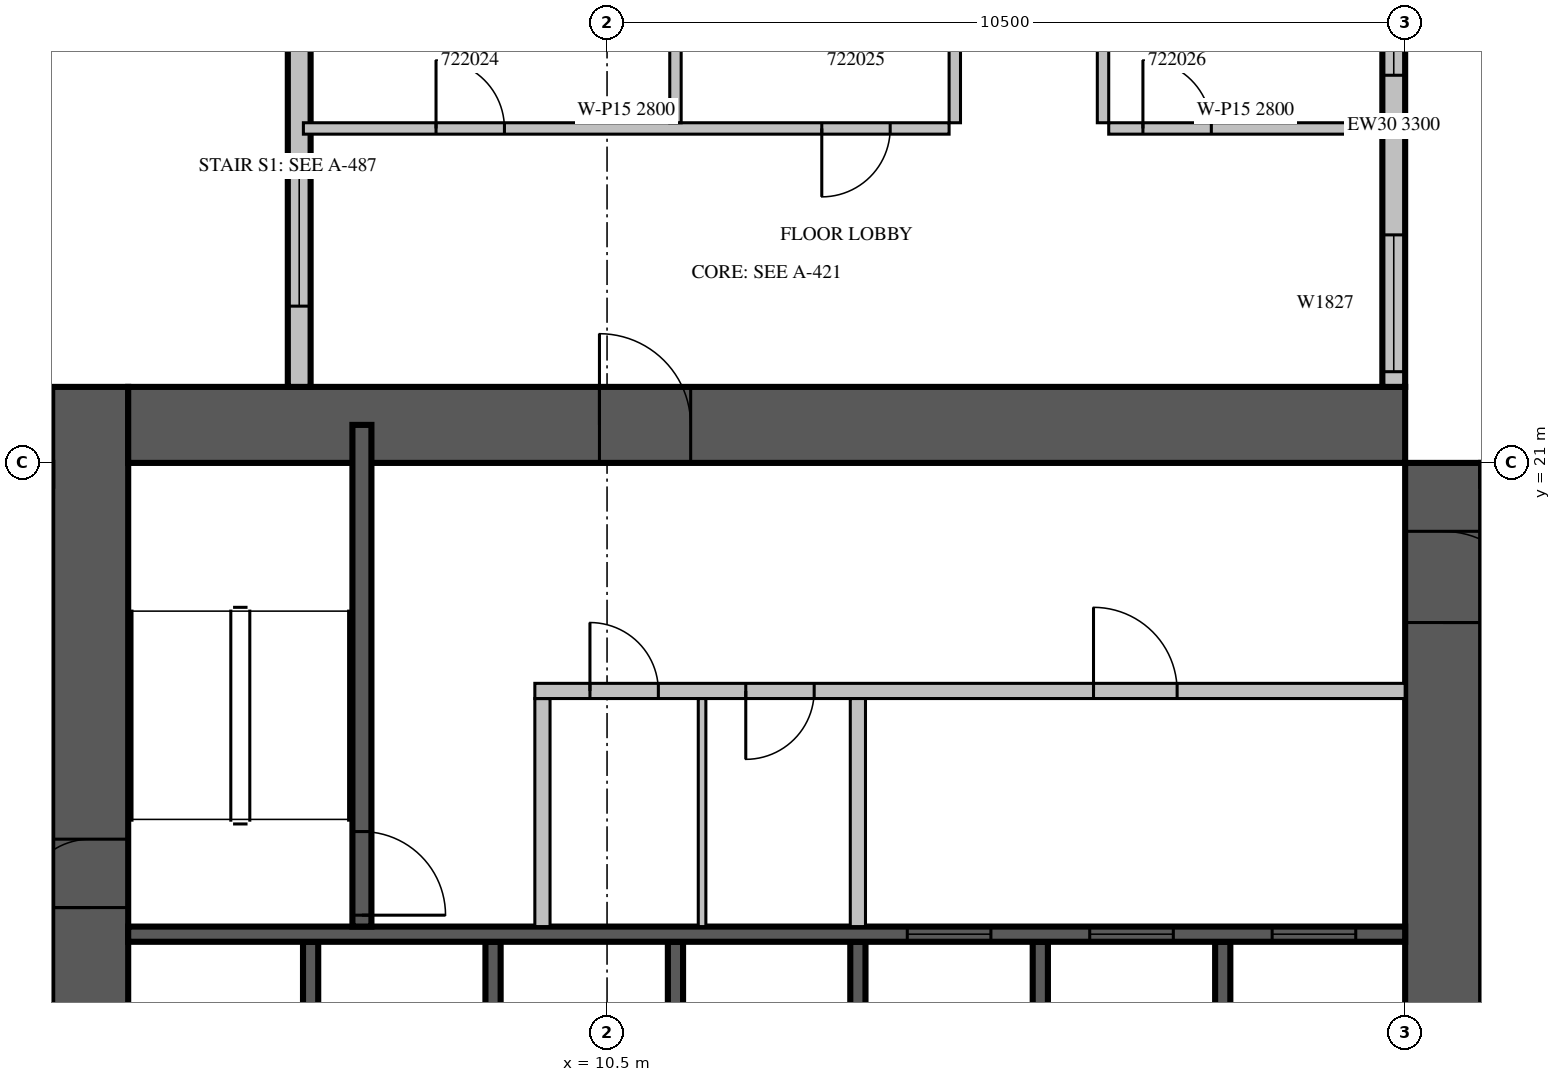
"""IFC4 building model, lengths in metres.
Left out: names, types, materials, properties, quantities, classifications, styles, units other than length and angle.
Written with IfcOpenShell. Run it as: python <this file> out.ifc"""

import sys

from ifc_helpers import new_model, si_unit, direction, frame, frame_2d, origin, place, context, subcontext, project, spatial, rectangle, extrude, source, transform, mapped, element, fill, save


model = new_model("IFC4")
c1 = context("Model", 3, precision=1e-05, world=origin(), true_north=direction((0.0, 1.0)))
c2 = subcontext(c1, "Body", "Model", "MODEL_VIEW")
j1 = project(units=[si_unit("LENGTHUNIT", "METRE"), si_unit("PLANEANGLEUNIT", "RADIAN")], contexts=[c1])
p1 = place(None, origin())
s1 = spatial("IfcSite", under=j1, at=p1, CompositionType="ELEMENT")
p2 = place(p1, origin())
s2 = spatial("IfcBuilding", under=s1, at=p2, CompositionType="ELEMENT")
p3 = place(p2, frame((0.0, 0.0, 103.5)))
s3 = spatial("IfcBuildingStorey", under=s2, at=p3, CompositionType="ELEMENT", Elevation=103.5)
p4 = place(p3, frame((3.7, 4.2, 0.0), z_axis=(0.0, 0.0, 1.0), x_axis=(0.0, 1.0, 0.0)))
e1 = element("IfcWall", 1, at=p4, inside=s3, PredefinedType="SHEAR", context=c2, shape_type="SweptSolid", body=[
    extrude(rectangle(XDim=17.8, YDim=1.0, at=frame_2d((8.9, 0.0))), origin(), (0.0, 0.0, 1.0), 4.2),
])
p5 = place(p4, frame((4.2, 0.0, 0.0)))
e2 = element("IfcOpeningElement", 2, at=p5, cuts=e1, PredefinedType="OPENING", context=c2, shape_type="SweptSolid", body=[
    extrude(rectangle(XDim=2.2, YDim=2.1, at=frame_2d((1.1, 1.05))), frame((0.0, 0.51, 0.0), z_axis=(0.0, -1.0, 0.0), x_axis=(1.0, 0.0, 0.0)), (0.0, 0.0, 1.0), 1.02),
])
p6 = place(p4, frame((10.95, 0.0, 0.0)))
e3 = element("IfcOpeningElement", 3, at=p6, cuts=e1, PredefinedType="OPENING", context=c2, shape_type="SweptSolid", body=[
    extrude(rectangle(XDim=0.9, YDim=2.1, at=frame_2d((0.45, 1.05))), frame((0.0, 0.51, 0.0), z_axis=(0.0, -1.0, 0.0), x_axis=(1.0, 0.0, 0.0)), (0.0, 0.0, 1.0), 1.02),
])
p7 = place(p3, frame((21.5, 4.2, 0.0), z_axis=(0.0, 0.0, 1.0), x_axis=(0.0, 1.0, 0.0)))
e4 = element("IfcWall", 4, at=p7, inside=s3, PredefinedType="SHEAR", context=c2, shape_type="SweptSolid", body=[
    extrude(rectangle(XDim=16.8, YDim=1.0, at=frame_2d((8.4, 0.0))), origin(), (0.0, 0.0, 1.0), 4.2),
])
m1 = source(origin(), c2, "Body", "SweptSolid", [
    extrude(rectangle(XDim=1.2, YDim=2.1, at=frame_2d((0.6, 1.05))), frame((0.0, 0.51, 0.0), z_axis=(0.0, -1.0, 0.0), x_axis=(1.0, 0.0, 0.0)), (0.0, 0.0, 1.0), 1.02),
])
p8 = place(p7, frame((14.7, 0.0, 0.0)))
e5 = element("IfcOpeningElement", 5, at=p8, cuts=e4, PredefinedType="OPENING", context=c2, shape_type="MappedRepresentation", body=[
    mapped(m1, transform((0.0, 0.0, 0.0), scale=1.0)),
])
m2 = source(origin(), c2, "Body", "SweptSolid", [
    extrude(rectangle(XDim=16.8, YDim=1.0, at=frame_2d((8.4, 0.0))), origin(), (0.0, 0.0, 1.0), 4.2),
])
p9 = place(p3, frame((4.2, 21.5, 0.0), z_axis=(0.0, 0.0, 1.0), x_axis=(1.0, 0.0, 0.0)))
e6 = element("IfcWall", 6, at=p9, inside=s3, PredefinedType="SHEAR", context=c2, shape_type="MappedRepresentation", body=[
    mapped(m2, transform((0.0, 0.0, 0.0), scale=1.0)),
])
p10 = place(p9, frame((6.2, 0.0, 0.0)))
e7 = element("IfcOpeningElement", 7, at=p10, cuts=e6, PredefinedType="OPENING", context=c2, shape_type="SweptSolid", body=[
    extrude(rectangle(XDim=1.2, YDim=2.1, at=frame_2d((0.6, 1.05))), frame((0.0, 0.51, 0.0), z_axis=(0.0, -1.0, 0.0), x_axis=(1.0, 0.0, 0.0)), (0.0, 0.0, 1.0), 1.02),
])
p11 = place(p3, frame((20.85, 22.0, 0.0), z_axis=(0.0, 0.0, 1.0), x_axis=(0.0, 1.0, 0.0)))
e8 = element("IfcWall", 8, at=p11, inside=s3, PredefinedType="STANDARD", context=c2, shape_type="SweptSolid", body=[
    extrude(rectangle(XDim=6.875, YDim=0.3, at=frame_2d((3.438, 0.0))), origin(), (0.0, 0.0, 1.0), 3.3),
])
m3 = source(origin(), c2, "Body", "SweptSolid", [
    extrude(rectangle(XDim=1.8, YDim=2.7, at=frame_2d((0.9, 1.35))), frame((0.0, 0.16, 0.0), z_axis=(0.0, -1.0, 0.0), x_axis=(1.0, 0.0, 0.0)), (0.0, 0.0, 1.0), 0.32),
])
p12 = place(p11, frame((0.2, 0.0, 0.6)))
e9 = element("IfcOpeningElement", 9, at=p12, cuts=e8, PredefinedType="OPENING", context=c2, shape_type="MappedRepresentation", body=[
    mapped(m3, transform((0.0, 0.0, 0.0), scale=1.0)),
])
m4 = source(origin(), c2, "Body", "SweptSolid", [
    extrude(rectangle(XDim=2.4, YDim=2.7, at=frame_2d((1.2, 1.35))), frame((0.0, 0.16, 0.0), z_axis=(0.0, -1.0, 0.0), x_axis=(1.0, 0.0, 0.0)), (0.0, 0.0, 1.0), 0.32),
])
p13 = place(p11, frame((4.1, 0.0, 0.6)))
e10 = element("IfcOpeningElement", 10, at=p13, cuts=e8, PredefinedType="OPENING", context=c2, shape_type="MappedRepresentation", body=[
    mapped(m4, transform((0.0, 0.0, 0.0), scale=1.0)),
])
p14 = place(p3, frame((6.45, 38.4, 0.0), z_axis=(0.0, 0.0, 1.0), x_axis=(0.0, -1.0, 0.0)))
e11 = element("IfcWall", 11, at=p14, inside=s3, PredefinedType="STANDARD", context=c2, shape_type="SweptSolid", body=[
    extrude(rectangle(XDim=16.4, YDim=0.3, at=frame_2d((8.2, 0.0))), origin(), (0.0, 0.0, 1.0), 3.3),
])
p15 = place(p14, frame((1.15, 0.0, 0.6)))
e12 = element("IfcOpeningElement", 12, at=p15, cuts=e11, PredefinedType="OPENING", context=c2, shape_type="MappedRepresentation", body=[
    mapped(m3, transform((0.0, 0.0, 0.0), scale=1.0)),
])
p16 = place(p14, frame((4.75, 0.0, 0.6)))
e13 = element("IfcOpeningElement", 13, at=p16, cuts=e11, PredefinedType="OPENING", context=c2, shape_type="MappedRepresentation", body=[
    mapped(m4, transform((0.0, 0.0, 0.0), scale=1.0)),
])
p17 = place(p14, frame((9.438, 0.0, 0.6)))
e14 = element("IfcOpeningElement", 14, at=p17, cuts=e11, PredefinedType="OPENING", context=c2, shape_type="MappedRepresentation", body=[
    mapped(m3, transform((0.0, 0.0, 0.0), scale=1.0)),
])
p18 = place(p14, frame((13.537, 0.0, 0.6)))
e15 = element("IfcOpeningElement", 15, at=p18, cuts=e11, PredefinedType="OPENING", context=c2, shape_type="MappedRepresentation", body=[
    mapped(m3, transform((0.0, 0.0, 0.0), scale=1.0)),
])
m5 = source(origin(), c2, "Body", "SweptSolid", [
    extrude(rectangle(XDim=3.0, YDim=0.2, at=frame_2d((1.5, 0.0))), origin(), (0.0, 0.0, 1.0), 4.2),
])
for number, where, z_axis, x_axis in (
    (16, (6.6, 11.7, 0.0), (0.0, 0.0, 1.0), (0.0, 1.0, 0.0)),
    (17, (9.0, 11.7, 0.0), (0.0, 0.0, 1.0), (0.0, 1.0, 0.0)),
    (18, (11.4, 11.7, 0.0), (0.0, 0.0, 1.0), (0.0, 1.0, 0.0)),
    (19, (13.8, 11.7, 0.0), (0.0, 0.0, 1.0), (0.0, 1.0, 0.0)),
    (20, (16.2, 11.7, 0.0), (0.0, 0.0, 1.0), (0.0, 1.0, 0.0)),
    (21, (18.6, 11.7, 0.0), (0.0, 0.0, 1.0), (0.0, 1.0, 0.0)),
):
    element("IfcWall", number, at=place(p3, frame(where, z_axis=z_axis, x_axis=x_axis)), inside=s3, PredefinedType="SOLIDWALL", context=c2, shape_type="MappedRepresentation", body=[
        mapped(m5, transform((0.0, 0.0, 0.0), scale=1.0)),
    ])
m6 = source(origin(), c2, "Body", "SweptSolid", [
    extrude(rectangle(XDim=16.8, YDim=0.2, at=frame_2d((8.4, 0.0))), origin(), (0.0, 0.0, 1.0), 4.2),
])
p19 = place(p3, frame((4.2, 14.8, 0.0), z_axis=(0.0, 0.0, 1.0), x_axis=(1.0, 0.0, 0.0)))
e22 = element("IfcWall", 22, at=p19, inside=s3, PredefinedType="SOLIDWALL", context=c2, shape_type="MappedRepresentation", body=[
    mapped(m6, transform((0.0, 0.0, 0.0), scale=1.0)),
])
m7 = source(origin(), c2, "Body", "SweptSolid", [
    extrude(rectangle(XDim=1.1, YDim=2.1, at=frame_2d((0.55, 1.05))), frame((0.0, 0.11, 0.0), z_axis=(0.0, -1.0, 0.0), x_axis=(1.0, 0.0, 0.0)), (0.0, 0.0, 1.0), 0.22),
])
p20 = place(p19, frame((10.25, 0.0, 0.0)))
e23 = element("IfcOpeningElement", 23, at=p20, cuts=e22, PredefinedType="OPENING", context=c2, shape_type="MappedRepresentation", body=[
    mapped(m7, transform((0.0, 0.0, 0.0), scale=1.0)),
])
p21 = place(p19, frame((12.65, 0.0, 0.0)))
e24 = element("IfcOpeningElement", 24, at=p21, cuts=e22, PredefinedType="OPENING", context=c2, shape_type="MappedRepresentation", body=[
    mapped(m7, transform((0.0, 0.0, 0.0), scale=1.0)),
])
p22 = place(p19, frame((15.05, 0.0, 0.0)))
e25 = element("IfcOpeningElement", 25, at=p22, cuts=e22, PredefinedType="OPENING", context=c2, shape_type="MappedRepresentation", body=[
    mapped(m7, transform((0.0, 0.0, 0.0), scale=1.0)),
])
m8 = source(origin(), c2, "Body", "SweptSolid", [
    extrude(rectangle(XDim=6.6, YDim=0.25, at=frame_2d((3.3, 0.0))), origin(), (0.0, 0.0, 1.0), 3.8),
])
p23 = place(p3, frame((7.275, 14.9, 0.0), z_axis=(0.0, 0.0, 1.0), x_axis=(0.0, 1.0, 0.0)))
e26 = element("IfcWall", 26, at=p23, inside=s3, PredefinedType="SOLIDWALL", context=c2, shape_type="MappedRepresentation", body=[
    mapped(m8, transform((0.0, 0.0, 0.0), scale=1.0)),
])
m9 = source(origin(), c2, "Body", "SweptSolid", [
    extrude(rectangle(XDim=1.1, YDim=2.1, at=frame_2d((0.55, 1.05))), frame((0.0, 0.135, 0.0), z_axis=(0.0, -1.0, 0.0), x_axis=(1.0, 0.0, 0.0)), (0.0, 0.0, 1.0), 0.27),
])
p24 = place(p23, frame((0.15, 0.0, 0.0)))
e27 = element("IfcOpeningElement", 27, at=p24, cuts=e26, PredefinedType="OPENING", context=c2, shape_type="MappedRepresentation", body=[
    mapped(m9, transform((0.0, 0.0, 0.0), scale=1.0)),
])
m10 = source(origin(), c2, "Body", "SweptSolid", [
    extrude(rectangle(XDim=3.0, YDim=0.2, at=frame_2d((1.5, 0.0))), origin(), (0.0, 0.0, 1.0), 3.8),
])
p25 = place(p3, frame((9.65, 14.9, 0.0), z_axis=(0.0, 0.0, 1.0), x_axis=(0.0, 1.0, 0.0)))
e28 = element("IfcWall", 28, at=p25, inside=s3, PredefinedType="PARTITIONING", context=c2, shape_type="MappedRepresentation", body=[
    mapped(m10, transform((0.0, 0.0, 0.0), scale=1.0)),
])
m11 = source(origin(), c2, "Body", "SweptSolid", [
    extrude(rectangle(XDim=11.45, YDim=0.2, at=frame_2d((5.725, 0.0))), origin(), (0.0, 0.0, 1.0), 3.8),
])
p26 = place(p3, frame((9.55, 18.0, 0.0), z_axis=(0.0, 0.0, 1.0), x_axis=(1.0, 0.0, 0.0)))
e29 = element("IfcWall", 29, at=p26, inside=s3, PredefinedType="PARTITIONING", context=c2, shape_type="MappedRepresentation", body=[
    mapped(m11, transform((0.0, 0.0, 0.0), scale=1.0)),
])
m12 = source(origin(), c2, "Body", "SweptSolid", [
    extrude(rectangle(XDim=0.9, YDim=2.1, at=frame_2d((0.45, 1.05))), frame((0.0, 0.11, 0.0), z_axis=(0.0, -1.0, 0.0), x_axis=(1.0, 0.0, 0.0)), (0.0, 0.0, 1.0), 0.22),
])
p27 = place(p26, frame((0.725, 0.0, 0.0)))
e30 = element("IfcOpeningElement", 30, at=p27, cuts=e29, PredefinedType="OPENING", context=c2, shape_type="MappedRepresentation", body=[
    mapped(m12, transform((0.0, 0.0, 0.0), scale=1.0)),
])
p28 = place(p26, frame((2.775, 0.0, 0.0)))
e31 = element("IfcOpeningElement", 31, at=p28, cuts=e29, PredefinedType="OPENING", context=c2, shape_type="MappedRepresentation", body=[
    mapped(m12, transform((0.0, 0.0, 0.0), scale=1.0)),
])
p29 = place(p26, frame((7.35, 0.0, 0.0)))
e32 = element("IfcOpeningElement", 32, at=p29, cuts=e29, PredefinedType="OPENING", context=c2, shape_type="MappedRepresentation", body=[
    mapped(m7, transform((0.0, 0.0, 0.0), scale=1.0)),
])
p30 = place(p3, frame((13.8, 14.9, 0.0), z_axis=(0.0, 0.0, 1.0), x_axis=(0.0, 1.0, 0.0)))
e33 = element("IfcWall", 33, at=p30, inside=s3, PredefinedType="PARTITIONING", context=c2, shape_type="MappedRepresentation", body=[
    mapped(m10, transform((0.0, 0.0, 0.0), scale=1.0)),
])
m13 = source(origin(), c2, "Body", "SweptSolid", [
    extrude(rectangle(XDim=3.0, YDim=0.1, at=frame_2d((1.5, 0.0))), origin(), (0.0, 0.0, 1.0), 3.8),
])
p31 = place(p3, frame((11.75, 14.9, 0.0), z_axis=(0.0, 0.0, 1.0), x_axis=(0.0, 1.0, 0.0)))
e34 = element("IfcWall", 34, at=p31, inside=s3, PredefinedType="PARTITIONING", context=c2, shape_type="MappedRepresentation", body=[
    mapped(m13, transform((0.0, 0.0, 0.0), scale=1.0)),
])
p32 = place(p3, frame((6.505, 25.4, 0.0), z_axis=(0.0, 0.0, 1.0), x_axis=(1.0, 0.0, 0.0)))
e35 = element("IfcWall", 35, at=p32, inside=s3, PredefinedType="PARTITIONING", context=c2, shape_type="SweptSolid", body=[
    extrude(rectangle(XDim=8.495, YDim=0.15, at=frame_2d((4.247, 0.0))), origin(), (0.0, 0.0, 1.0), 2.8),
])
m14 = source(origin(), c2, "Body", "SweptSolid", [
    extrude(rectangle(XDim=0.9, YDim=2.1, at=frame_2d((0.45, 1.05))), frame((0.0, 0.085, 0.0), z_axis=(0.0, -1.0, 0.0), x_axis=(1.0, 0.0, 0.0)), (0.0, 0.0, 1.0), 0.17),
])
p33 = place(p32, frame((1.745, 0.0, 0.0)))
e36 = element("IfcOpeningElement", 36, at=p33, cuts=e35, PredefinedType="OPENING", context=c2, shape_type="MappedRepresentation", body=[
    mapped(m14, transform((0.0, 0.0, 0.0), scale=1.0)),
])
p34 = place(p32, frame((6.82, 0.0, 0.0)))
e37 = element("IfcOpeningElement", 37, at=p34, cuts=e35, PredefinedType="OPENING", context=c2, shape_type="MappedRepresentation", body=[
    mapped(m14, transform((0.0, 0.0, 0.0), scale=1.0)),
])
m15 = source(origin(), c2, "Body", "SweptSolid", [
    extrude(rectangle(XDim=3.6, YDim=0.15, at=frame_2d((1.8, 0.0))), origin(), (0.0, 0.0, 1.0), 2.8),
])
p35 = place(p3, frame((17.1, 25.4, 0.0), z_axis=(0.0, 0.0, 1.0), x_axis=(1.0, 0.0, 0.0)))
e38 = element("IfcWall", 38, at=p35, inside=s3, PredefinedType="PARTITIONING", context=c2, shape_type="MappedRepresentation", body=[
    mapped(m15, transform((0.0, 0.0, 0.0), scale=1.0)),
])
p36 = place(p35, frame((0.45, 0.0, 0.0)))
e39 = element("IfcOpeningElement", 39, at=p36, cuts=e38, PredefinedType="OPENING", context=c2, shape_type="MappedRepresentation", body=[
    mapped(m14, transform((0.0, 0.0, 0.0), scale=1.0)),
])
p37 = place(p3, frame((11.4, 25.475, 0.0), z_axis=(0.0, 0.0, 1.0), x_axis=(0.0, 1.0, 0.0)))
e40 = element("IfcWall", 40, at=p37, inside=s3, PredefinedType="PARTITIONING", context=c2, shape_type="SweptSolid", body=[
    extrude(rectangle(XDim=3.85, YDim=0.15, at=frame_2d((1.925, 0.0))), origin(), (0.0, 0.0, 1.0), 3.3),
])
m16 = source(origin(), c2, "Body", "SweptSolid", [
    extrude(rectangle(XDim=3.85, YDim=0.15, at=frame_2d((1.925, 0.0))), origin(), (0.0, 0.0, 1.0), 3.3),
])
for number, where, z_axis, x_axis in (
    (41, (15.075, 25.475, 0.0), (0.0, 0.0, 1.0), (0.0, 1.0, 0.0)),
    (42, (17.025, 29.325, 0.0), (0.0, 0.0, 1.0), (0.0, -1.0, 0.0)),
):
    element("IfcWall", number, at=place(p3, frame(where, z_axis=z_axis, x_axis=x_axis)), inside=s3, PredefinedType="PARTITIONING", context=c2, shape_type="MappedRepresentation", body=[
        mapped(m16, transform((0.0, 0.0, 0.0), scale=1.0)),
    ])
m17 = source(origin(), c2, "Body", "SweptSolid", [
    extrude(rectangle(XDim=1.8, YDim=2.7, at=frame_2d((0.9, 1.35))), frame((0.0, 0.03, 0.0), z_axis=(0.0, -1.0, 0.0), x_axis=(1.0, 0.0, 0.0)), (0.0, 0.0, 1.0), 0.06),
])
p38 = place(p12, origin())
e43 = element("IfcWindow", 43, at=p38, inside=s3, PartitioningType="SINGLE_PANEL", PredefinedType="WINDOW", context=c2, shape_type="MappedRepresentation", body=[
    mapped(m17, transform((0.0, 0.0, 0.0), scale=1.0)),
])
fill(e9, e43)
m18 = source(origin(), c2, "Body", "SweptSolid", [
    extrude(rectangle(XDim=2.4, YDim=2.7, at=frame_2d((1.2, 1.35))), frame((0.0, 0.03, 0.0), z_axis=(0.0, -1.0, 0.0), x_axis=(1.0, 0.0, 0.0)), (0.0, 0.0, 1.0), 0.06),
])
p39 = place(p13, origin())
e44 = element("IfcWindow", 44, at=p39, inside=s3, PartitioningType="SINGLE_PANEL", PredefinedType="WINDOW", context=c2, shape_type="MappedRepresentation", body=[
    mapped(m18, transform((0.0, 0.0, 0.0), scale=1.0)),
])
fill(e10, e44)
p40 = place(p18, origin())
e45 = element("IfcWindow", 45, at=p40, inside=s3, PartitioningType="SINGLE_PANEL", PredefinedType="WINDOW", context=c2, shape_type="MappedRepresentation", body=[
    mapped(m17, transform((0.0, 0.0, 0.0), scale=1.0)),
])
fill(e15, e45)
m19 = source(origin(), c2, "Body", "SweptSolid", [
    extrude(rectangle(XDim=1.1, YDim=2.1, at=frame_2d((0.55, 1.05))), frame((0.0, 0.025, 0.0), z_axis=(0.0, -1.0, 0.0), x_axis=(1.0, 0.0, 0.0)), (0.0, 0.0, 1.0), 0.05),
])
p41 = place(p20, origin())
e46 = element("IfcDoor", 46, at=p41, inside=s3, OperationType="SLIDING_TO_LEFT", PredefinedType="DOOR", context=c2, shape_type="MappedRepresentation", body=[
    mapped(m19, transform((0.0, 0.0, 0.0), scale=1.0)),
])
fill(e23, e46)
p42 = place(p21, origin())
e47 = element("IfcDoor", 47, at=p42, inside=s3, OperationType="SLIDING_TO_LEFT", PredefinedType="DOOR", context=c2, shape_type="MappedRepresentation", body=[
    mapped(m19, transform((0.0, 0.0, 0.0), scale=1.0)),
])
fill(e24, e47)
p43 = place(p22, origin())
e48 = element("IfcDoor", 48, at=p43, inside=s3, OperationType="SLIDING_TO_LEFT", PredefinedType="DOOR", context=c2, shape_type="MappedRepresentation", body=[
    mapped(m19, transform((0.0, 0.0, 0.0), scale=1.0)),
])
fill(e25, e48)
p44 = place(p24, origin())
e49 = element("IfcDoor", 49, at=p44, inside=s3, OperationType="SINGLE_SWING_RIGHT", PredefinedType="DOOR", context=c2, shape_type="MappedRepresentation", body=[
    mapped(m19, transform((0.0, 0.0, 0.0), scale=1.0)),
])
fill(e27, e49)
m20 = source(origin(), c2, "Body", "SweptSolid", [
    extrude(rectangle(XDim=0.9, YDim=2.1, at=frame_2d((0.45, 1.05))), frame((0.0, 0.025, 0.0), z_axis=(0.0, -1.0, 0.0), x_axis=(1.0, 0.0, 0.0)), (0.0, 0.0, 1.0), 0.05),
])
p45 = place(p27, origin())
e50 = element("IfcDoor", 50, at=p45, inside=s3, OperationType="SINGLE_SWING_LEFT", PredefinedType="DOOR", context=c2, shape_type="MappedRepresentation", body=[
    mapped(m20, transform((0.0, 0.0, 0.0), scale=1.0)),
])
fill(e30, e50)
p46 = place(p28, origin())
e51 = element("IfcDoor", 51, at=p46, inside=s3, OperationType="SINGLE_SWING_RIGHT", PredefinedType="DOOR", context=c2, shape_type="MappedRepresentation", body=[
    mapped(m20, transform((0.0, 0.0, 0.0), scale=1.0)),
])
fill(e31, e51)
p47 = place(p29, origin())
e52 = element("IfcDoor", 52, at=p47, inside=s3, OperationType="SINGLE_SWING_LEFT", PredefinedType="DOOR", context=c2, shape_type="MappedRepresentation", body=[
    mapped(m19, transform((0.0, 0.0, 0.0), scale=1.0)),
])
fill(e32, e52)
m21 = source(origin(), c2, "Body", "SweptSolid", [
    extrude(rectangle(XDim=1.2, YDim=2.1, at=frame_2d((0.6, 1.05))), frame((0.0, 0.025, 0.0), z_axis=(0.0, -1.0, 0.0), x_axis=(1.0, 0.0, 0.0)), (0.0, 0.0, 1.0), 0.05),
])
p48 = place(p10, origin())
e53 = element("IfcDoor", 53, at=p48, inside=s3, OperationType="SINGLE_SWING_LEFT", PredefinedType="DOOR", context=c2, shape_type="MappedRepresentation", body=[
    mapped(m21, transform((0.0, 0.0, 0.0), scale=1.0)),
])
fill(e7, e53)
p49 = place(p8, origin())
e54 = element("IfcDoor", 54, at=p49, inside=s3, OperationType="SINGLE_SWING_RIGHT", PredefinedType="DOOR", context=c2, shape_type="MappedRepresentation", body=[
    mapped(m21, transform((0.0, 0.0, 0.0), scale=1.0)),
])
fill(e5, e54)
p50 = place(p6, origin())
e55 = element("IfcDoor", 55, at=p50, inside=s3, OperationType="SINGLE_SWING_LEFT", PredefinedType="DOOR", context=c2, shape_type="MappedRepresentation", body=[
    mapped(m20, transform((0.0, 0.0, 0.0), scale=1.0)),
])
fill(e3, e55)
p51 = place(p33, origin())
e56 = element("IfcDoor", 56, at=p51, inside=s3, OperationType="SINGLE_SWING_LEFT", PredefinedType="DOOR", context=c2, shape_type="MappedRepresentation", body=[
    mapped(m20, transform((0.0, 0.0, 0.0), scale=1.0)),
])
fill(e36, e56)
p52 = place(p34, origin())
e57 = element("IfcDoor", 57, at=p52, inside=s3, OperationType="SINGLE_SWING_RIGHT", PredefinedType="DOOR", context=c2, shape_type="MappedRepresentation", body=[
    mapped(m20, transform((0.0, 0.0, 0.0), scale=1.0)),
])
fill(e37, e57)
p53 = place(p36, origin())
e58 = element("IfcDoor", 58, at=p53, inside=s3, OperationType="SINGLE_SWING_LEFT", PredefinedType="DOOR", context=c2, shape_type="MappedRepresentation", body=[
    mapped(m20, transform((0.0, 0.0, 0.0), scale=1.0)),
])
fill(e39, e58)
save(model, sys.argv[1])
